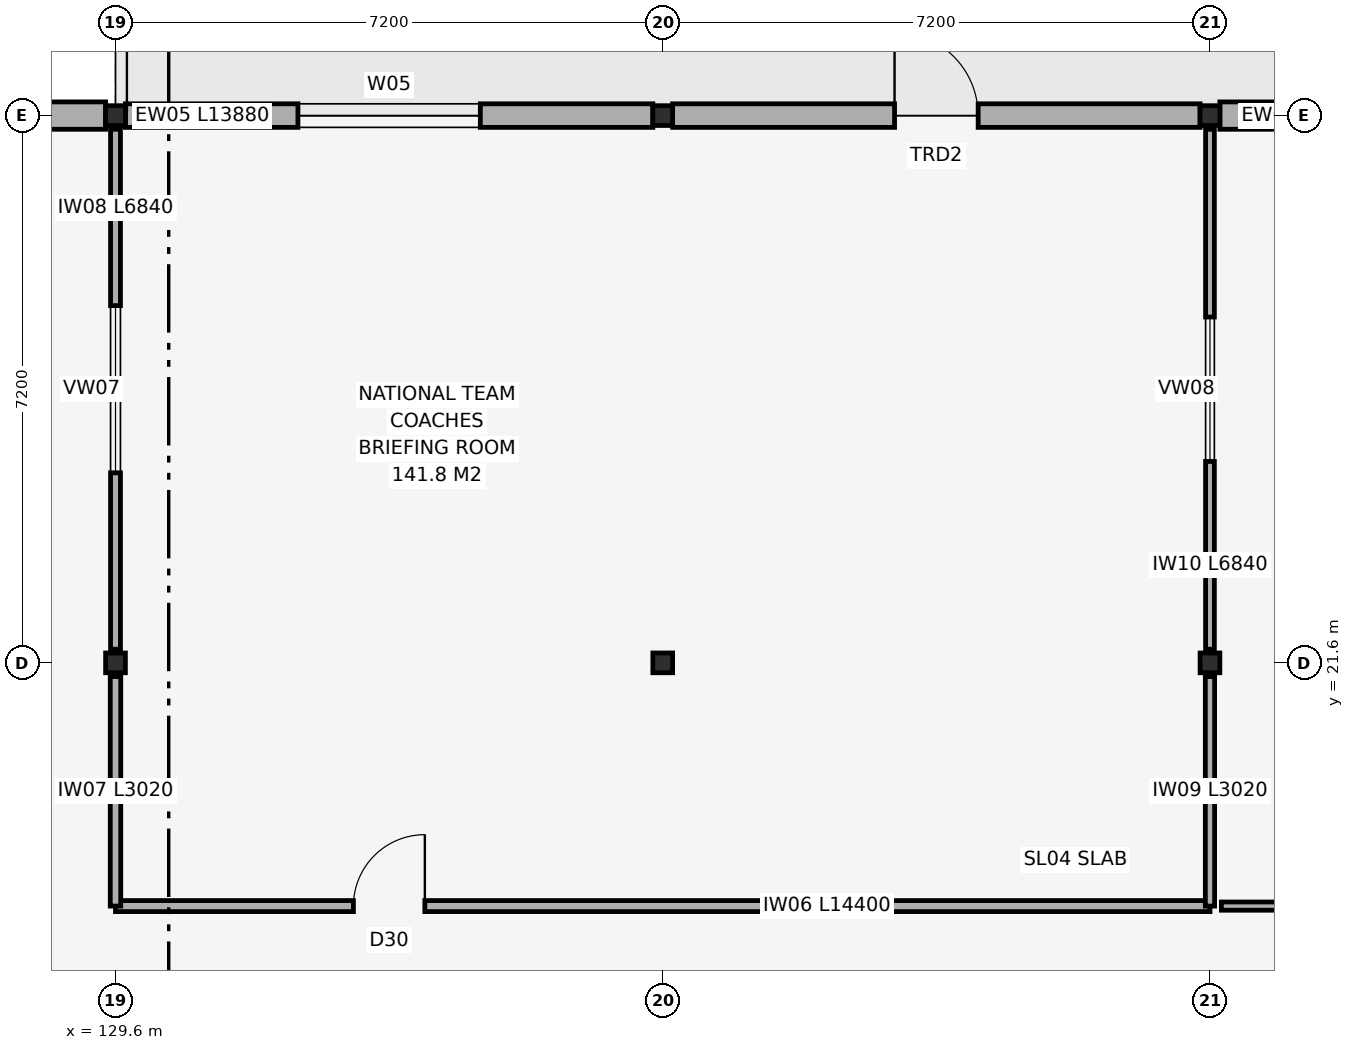
"""IFC4 building model, lengths in metres.
Left out: names, types, materials, properties, quantities, classifications, styles, units other than length and angle.
Written with IfcOpenShell. Run it as: python <this file> out.ifc"""

import sys

from ifc_helpers import new_model, si_unit, direction, frame, frame_2d, origin, origin_2d, place, context, subcontext, project, spatial, rectangle, hollow_rectangle, extrude, element, fill, save


model = new_model("IFC4")
c1 = context("Model", 3, precision=1e-05, world=origin(), true_north=direction((0.0, 1.0)))
c2 = subcontext(c1, "Body", "Model", "MODEL_VIEW")
j1 = project(units=[si_unit("LENGTHUNIT", "METRE"), si_unit("PLANEANGLEUNIT", "RADIAN")], contexts=[c1])
p1 = place(None, origin())
s1 = spatial("IfcSite", under=j1, at=p1, CompositionType="ELEMENT")
p2 = place(p1, origin())
s2 = spatial("IfcBuilding", under=s1, at=p2, CompositionType="ELEMENT")
p3 = place(p2, frame((0.0, 0.0, 23.4)))
s3 = spatial("IfcBuildingStorey", under=s2, at=p3, CompositionType="ELEMENT", Elevation=23.4)
for number, where, z_axis, x_axis in (
    (1, (129.6, 21.6, 0.0), (0.0, 0.0, 1.0), (1.0, 0.0, 0.0)),
    (2, (129.6, 28.8, 0.0), (0.0, 0.0, 1.0), (1.0, 0.0, 0.0)),
    (3, (136.8, 21.6, 0.0), (0.0, 0.0, 1.0), (1.0, 0.0, 0.0)),
    (4, (136.8, 28.8, 0.0), (0.0, 0.0, 1.0), (1.0, 0.0, 0.0)),
    (5, (144.0, 21.6, 0.0), (0.0, 0.0, 1.0), (1.0, 0.0, 0.0)),
    (6, (144.0, 28.8, 0.0), (0.0, 0.0, 1.0), (1.0, 0.0, 0.0)),
):
    element("IfcColumn", number, at=place(p3, frame(where, z_axis=z_axis, x_axis=x_axis)), inside=s3, PredefinedType="COLUMN", context=c2, shape_type="SweptSolid", body=[
        extrude(hollow_rectangle(XDim=0.26, YDim=0.26, WallThickness=0.012, at=origin_2d()), origin(), (0.0, 0.0, 1.0), 4.2),
    ])
p4 = place(p3, frame((122.53, 28.8, 0.0), z_axis=(0.0, 0.0, 1.0), x_axis=(1.0, 0.0, 0.0)))
e7 = element("IfcWall", 7, at=p4, inside=s3, PredefinedType="SOLIDWALL", context=c2, shape_type="SweptSolid", body=[
    extrude(rectangle(XDim=6.94, YDim=0.36, at=frame_2d((3.47, 0.0))), origin(), (0.0, 0.0, 1.0), 3.98),
])
p5 = place(p4, frame((2.42, 0.0, 0.95)))
e8 = element("IfcOpeningElement", 8, at=p5, cuts=e7, PredefinedType="OPENING", context=c2, shape_type="SweptSolid", body=[
    extrude(rectangle(XDim=2.1, YDim=2.65, at=frame_2d((1.05, 1.325))), frame((0.0, 0.195, 0.0), z_axis=(0.0, -1.0, 0.0), x_axis=(1.0, 0.0, 0.0)), (0.0, 0.0, 1.0), 0.39),
])
p6 = place(p3, frame((129.73, 28.8, 0.0), z_axis=(0.0, 0.0, 1.0), x_axis=(1.0, 0.0, 0.0)))
e9 = element("IfcWall", 9, at=p6, inside=s3, PredefinedType="SOLIDWALL", context=c2, shape_type="SweptSolid", body=[
    extrude(rectangle(XDim=6.94, YDim=0.31, at=frame_2d((3.47, 0.0))), origin(), (0.0, 0.0, 1.0), 3.98),
])
p7 = place(p6, frame((2.27, 0.0, 0.95)))
e10 = element("IfcOpeningElement", 10, at=p7, cuts=e9, PredefinedType="OPENING", context=c2, shape_type="SweptSolid", body=[
    extrude(rectangle(XDim=2.4, YDim=2.0, at=frame_2d((1.2, 1.0))), frame((0.0, 0.17, 0.0), z_axis=(0.0, -1.0, 0.0), x_axis=(1.0, 0.0, 0.0)), (0.0, 0.0, 1.0), 0.34),
])
p8 = place(p3, frame((136.93, 28.8, 0.0), z_axis=(0.0, 0.0, 1.0), x_axis=(1.0, 0.0, 0.0)))
e11 = element("IfcWall", 11, at=p8, inside=s3, PredefinedType="SOLIDWALL", context=c2, shape_type="SweptSolid", body=[
    extrude(rectangle(XDim=6.94, YDim=0.31, at=frame_2d((3.47, 0.0))), origin(), (0.0, 0.0, 1.0), 3.98),
])
p9 = place(p8, frame((2.92, 0.0, 0.0)))
e12 = element("IfcOpeningElement", 12, at=p9, cuts=e11, PredefinedType="OPENING", context=c2, shape_type="SweptSolid", body=[
    extrude(rectangle(XDim=1.1, YDim=2.2, at=frame_2d((0.55, 1.1))), frame((0.0, 0.17, 0.0), z_axis=(0.0, -1.0, 0.0), x_axis=(1.0, 0.0, 0.0)), (0.0, 0.0, 1.0), 0.34),
])
p10 = place(p3, frame((144.13, 28.8, 0.0), z_axis=(0.0, 0.0, 1.0), x_axis=(1.0, 0.0, 0.0)))
e13 = element("IfcWall", 13, at=p10, inside=s3, PredefinedType="SOLIDWALL", context=c2, shape_type="SweptSolid", body=[
    extrude(rectangle(XDim=6.94, YDim=0.36, at=frame_2d((3.47, 0.0))), origin(), (0.0, 0.0, 1.0), 3.98),
])
p11 = place(p10, frame((2.42, 0.0, 0.95)))
e14 = element("IfcOpeningElement", 14, at=p11, cuts=e13, PredefinedType="OPENING", context=c2, shape_type="SweptSolid", body=[
    extrude(rectangle(XDim=2.1, YDim=1.75, at=frame_2d((1.05, 0.875))), frame((0.0, 0.195, 0.0), z_axis=(0.0, -1.0, 0.0), x_axis=(1.0, 0.0, 0.0)), (0.0, 0.0, 1.0), 0.39),
])
p12 = place(p3, frame((129.6, 18.4, 0.0), z_axis=(0.0, 0.0, 1.0), x_axis=(1.0, 0.0, 0.0)))
e15 = element("IfcWall", 15, at=p12, inside=s3, PredefinedType="PARTITIONING", context=c2, shape_type="SweptSolid", body=[
    extrude(rectangle(XDim=14.4, YDim=0.145, at=frame_2d((7.2, 0.0))), origin(), (0.0, 0.0, 1.0), 3.98),
])
p13 = place(p12, frame((3.13, 0.0, 0.0)))
e16 = element("IfcOpeningElement", 16, at=p13, cuts=e15, PredefinedType="OPENING", context=c2, shape_type="SweptSolid", body=[
    extrude(rectangle(XDim=0.94, YDim=2.15, at=frame_2d((0.47, 1.075))), frame((0.0, 0.087, 0.0), z_axis=(0.0, -1.0, 0.0), x_axis=(1.0, 0.0, 0.0)), (0.0, 0.0, 1.0), 0.175),
])
p14 = place(p3, frame((129.6, 18.4, 0.0), z_axis=(0.0, 0.0, 1.0), x_axis=(0.0, 1.0, 0.0)))
e17 = element("IfcWall", 17, at=p14, inside=s3, PredefinedType="PARTITIONING", context=c2, shape_type="SweptSolid", body=[
    extrude(rectangle(XDim=3.02, YDim=0.138, at=frame_2d((1.51, 0.0))), origin(), (0.0, 0.0, 1.0), 3.98),
])
p15 = place(p3, frame((129.6, 21.78, 0.0), z_axis=(0.0, 0.0, 1.0), x_axis=(0.0, 1.0, 0.0)))
e18 = element("IfcWall", 18, at=p15, inside=s3, PredefinedType="PARTITIONING", context=c2, shape_type="SweptSolid", body=[
    extrude(rectangle(XDim=6.84, YDim=0.13, at=frame_2d((3.42, 0.0))), origin(), (0.0, 0.0, 1.0), 3.98),
])
p16 = place(p15, frame((2.32, 0.0, 0.95)))
e19 = element("IfcOpeningElement", 19, at=p16, cuts=e18, PredefinedType="OPENING", context=c2, shape_type="SweptSolid", body=[
    extrude(rectangle(XDim=2.2, YDim=1.35, at=frame_2d((1.1, 0.675))), frame((0.0, 0.08, 0.0), z_axis=(0.0, -1.0, 0.0), x_axis=(1.0, 0.0, 0.0)), (0.0, 0.0, 1.0), 0.16),
])
p17 = place(p3, frame((144.0, 18.4, 0.0), z_axis=(0.0, 0.0, 1.0), x_axis=(0.0, 1.0, 0.0)))
e20 = element("IfcWall", 20, at=p17, inside=s3, PredefinedType="PARTITIONING", context=c2, shape_type="SweptSolid", body=[
    extrude(rectangle(XDim=3.02, YDim=0.122, at=frame_2d((1.51, 0.0))), origin(), (0.0, 0.0, 1.0), 3.98),
])
p18 = place(p3, frame((144.0, 21.78, 0.0), z_axis=(0.0, 0.0, 1.0), x_axis=(0.0, 1.0, 0.0)))
e21 = element("IfcWall", 21, at=p18, inside=s3, PredefinedType="PARTITIONING", context=c2, shape_type="SweptSolid", body=[
    extrude(rectangle(XDim=6.84, YDim=0.115, at=frame_2d((3.42, 0.0))), origin(), (0.0, 0.0, 1.0), 3.98),
])
p19 = place(p18, frame((2.47, 0.0, 0.95)))
e22 = element("IfcOpeningElement", 22, at=p19, cuts=e21, PredefinedType="OPENING", context=c2, shape_type="SweptSolid", body=[
    extrude(rectangle(XDim=1.9, YDim=1.35, at=frame_2d((0.95, 0.675))), frame((0.0, 0.072, 0.0), z_axis=(0.0, -1.0, 0.0), x_axis=(1.0, 0.0, 0.0)), (0.0, 0.0, 1.0), 0.145),
])
p20 = place(p3, frame((144.15, 18.4, 0.0), z_axis=(0.0, 0.0, 1.0), x_axis=(1.0, 0.0, 0.0)))
e23 = element("IfcWall", 23, at=p20, inside=s3, PredefinedType="PARTITIONING", context=c2, shape_type="SweptSolid", body=[
    extrude(rectangle(XDim=7.05, YDim=0.108, at=frame_2d((3.525, 0.0))), origin(), (0.0, 0.0, 1.0), 3.98),
])
p21 = place(p20, frame((2.69, 0.0, 0.0)))
e24 = element("IfcOpeningElement", 24, at=p21, cuts=e23, PredefinedType="OPENING", context=c2, shape_type="SweptSolid", body=[
    extrude(rectangle(XDim=1.52, YDim=2.2, at=frame_2d((0.76, 1.1))), frame((0.0, 0.069, 0.0), z_axis=(0.0, -1.0, 0.0), x_axis=(1.0, 0.0, 0.0)), (0.0, 0.0, 1.0), 0.138),
])
p22 = place(p7, origin())
e25 = element("IfcWindow", 25, at=p22, inside=s3, PartitioningType="SINGLE_PANEL", PredefinedType="WINDOW", context=c2, shape_type="SweptSolid", body=[
    extrude(rectangle(XDim=2.4, YDim=2.0, at=frame_2d((1.2, 1.0))), frame((0.0, 0.03, 0.0), z_axis=(0.0, -1.0, 0.0), x_axis=(1.0, 0.0, 0.0)), (0.0, 0.0, 1.0), 0.06),
])
fill(e10, e25)
p23 = place(p9, origin())
e26 = element("IfcDoor", 26, at=p23, inside=s3, OperationType="SINGLE_SWING_LEFT", PredefinedType="DOOR", context=c2, shape_type="SweptSolid", body=[
    extrude(rectangle(XDim=1.1, YDim=2.2, at=frame_2d((0.55, 1.1))), frame((0.0, 0.025, 0.0), z_axis=(0.0, -1.0, 0.0), x_axis=(1.0, 0.0, 0.0)), (0.0, 0.0, 1.0), 0.05),
])
fill(e12, e26)
p24 = place(p13, origin())
e27 = element("IfcDoor", 27, at=p24, inside=s3, OperationType="SINGLE_SWING_RIGHT", PredefinedType="DOOR", context=c2, shape_type="SweptSolid", body=[
    extrude(rectangle(XDim=0.94, YDim=2.15, at=frame_2d((0.47, 1.075))), frame((0.0, 0.025, 0.0), z_axis=(0.0, -1.0, 0.0), x_axis=(1.0, 0.0, 0.0)), (0.0, 0.0, 1.0), 0.05),
])
fill(e16, e27)
p25 = place(p16, origin())
e28 = element("IfcWindow", 28, at=p25, inside=s3, PartitioningType="SINGLE_PANEL", PredefinedType="WINDOW", context=c2, shape_type="SweptSolid", body=[
    extrude(rectangle(XDim=2.2, YDim=1.35, at=frame_2d((1.1, 0.675))), frame((0.0, 0.03, 0.0), z_axis=(0.0, -1.0, 0.0), x_axis=(1.0, 0.0, 0.0)), (0.0, 0.0, 1.0), 0.06),
])
fill(e19, e28)
p26 = place(p19, origin())
e29 = element("IfcWindow", 29, at=p26, inside=s3, PartitioningType="SINGLE_PANEL", PredefinedType="WINDOW", context=c2, shape_type="SweptSolid", body=[
    extrude(rectangle(XDim=1.9, YDim=1.35, at=frame_2d((0.95, 0.675))), frame((0.0, 0.03, 0.0), z_axis=(0.0, -1.0, 0.0), x_axis=(1.0, 0.0, 0.0)), (0.0, 0.0, 1.0), 0.06),
])
fill(e22, e29)
save(model, sys.argv[1])
